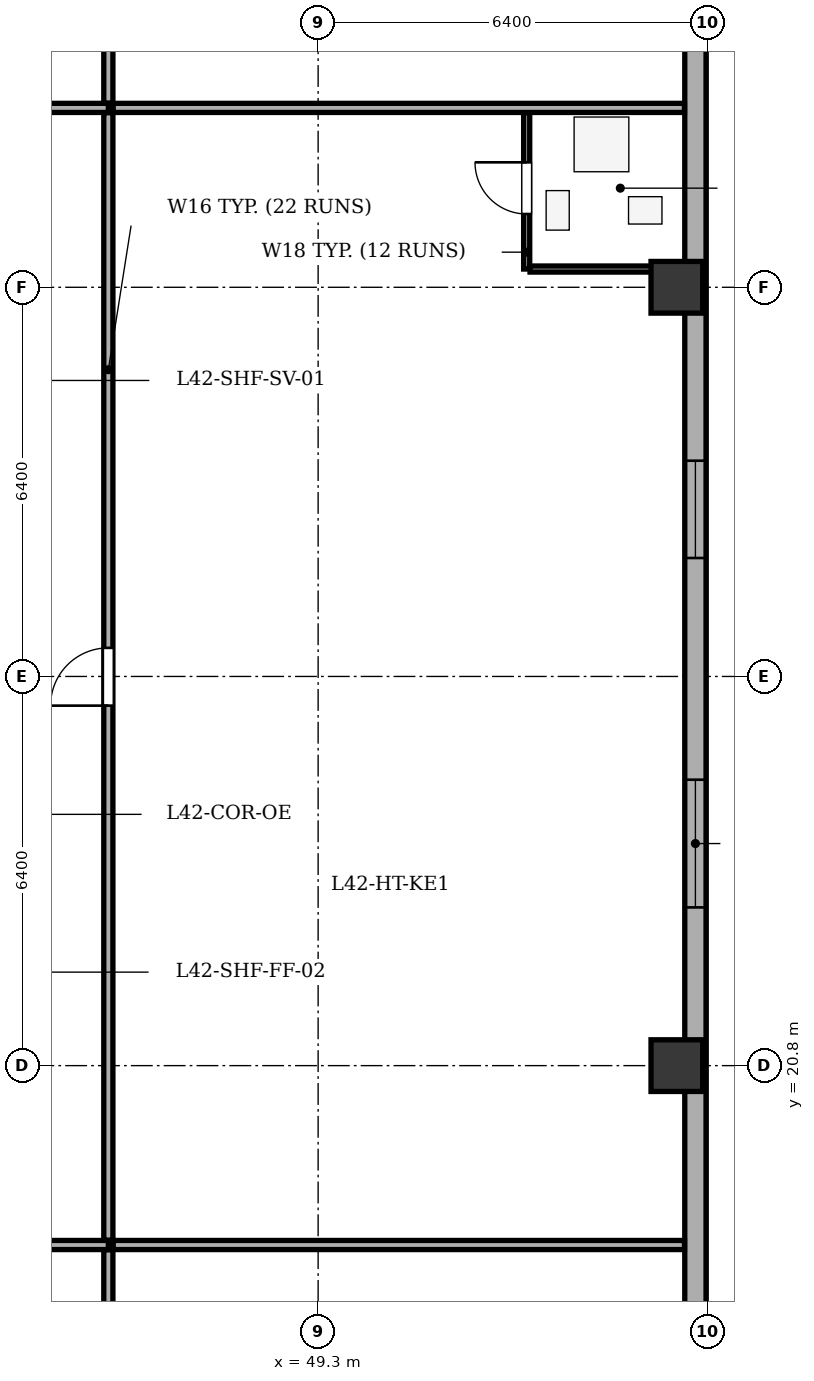
"""IFC4 building model, lengths in metres.
Left out: names, types, materials, properties, quantities, classifications, styles, units other than length and angle.
Written with IfcOpenShell. Run it as: python <this file> out.ifc"""

import sys

from ifc_helpers import new_model, si_unit, direction, frame, frame_2d, origin, origin_2d, place, context, subcontext, project, spatial, rectangle, extrude, element, fill, save


model = new_model("IFC4")
c1 = context("Model", 3, precision=1e-05, world=origin(), true_north=direction((0.0, 1.0)))
c2 = subcontext(c1, "Body", "Model", "MODEL_VIEW")
j1 = project(units=[si_unit("LENGTHUNIT", "METRE"), si_unit("PLANEANGLEUNIT", "RADIAN")], contexts=[c1])
p1 = place(None, origin())
s1 = spatial("IfcSite", under=j1, at=p1, CompositionType="ELEMENT")
p2 = place(p1, origin())
s2 = spatial("IfcBuilding", under=s1, at=p2, CompositionType="ELEMENT")
p3 = place(p2, frame((0.0, 0.0, 165.8)))
s3 = spatial("IfcBuildingStorey", under=s2, at=p3, CompositionType="ELEMENT", Elevation=165.8)
for number, where, z_axis, x_axis in (
    (1, (55.2, 20.8, 0.0), (0.0, 0.0, 1.0), (1.0, 0.0, 0.0)),
    (2, (55.2, 33.6, 0.0), (0.0, 0.0, 1.0), (1.0, 0.0, 0.0)),
):
    element("IfcColumn", number, at=place(p3, frame(where, z_axis=z_axis, x_axis=x_axis)), inside=s3, PredefinedType="COLUMN", context=c2, shape_type="SweptSolid", body=[
        extrude(rectangle(XDim=0.85, YDim=0.85, at=origin_2d()), origin(), (0.0, 0.0, 1.0), 3.5),
    ])
p4 = place(p3, frame((55.505, 47.9, 0.0), z_axis=(0.0, 0.0, 1.0), x_axis=(0.0, -1.0, 0.0)))
e3 = element("IfcWall", 3, at=p4, inside=s3, PredefinedType="STANDARD", context=c2, shape_type="SweptSolid", body=[
    extrude(rectangle(XDim=35.0, YDim=0.35, at=frame_2d((17.5, 0.0))), origin(), (0.0, 0.0, 1.0), 2.785),
])
p5 = place(p4, frame((2.595, 0.0, 0.75)))
e4 = element("IfcOpeningElement", 4, at=p5, cuts=e3, PredefinedType="OPENING", context=c2, shape_type="SweptSolid", body=[
    extrude(rectangle(XDim=1.6, YDim=1.75, at=frame_2d((0.8, 0.875))), frame((0.0, 0.185, 0.0), z_axis=(0.0, -1.0, 0.0), x_axis=(1.0, 0.0, 0.0)), (0.0, 0.0, 1.0), 0.37),
])
p6 = place(p4, frame((7.181, 0.0, 0.75)))
e5 = element("IfcOpeningElement", 5, at=p6, cuts=e3, PredefinedType="OPENING", context=c2, shape_type="SweptSolid", body=[
    extrude(rectangle(XDim=2.1, YDim=1.75, at=frame_2d((1.05, 0.875))), frame((0.0, 0.185, 0.0), z_axis=(0.0, -1.0, 0.0), x_axis=(1.0, 0.0, 0.0)), (0.0, 0.0, 1.0), 0.37),
])
p7 = place(p4, frame((17.152, 0.0, 0.75)))
e6 = element("IfcOpeningElement", 6, at=p7, cuts=e3, PredefinedType="OPENING", context=c2, shape_type="SweptSolid", body=[
    extrude(rectangle(XDim=1.6, YDim=1.75, at=frame_2d((0.8, 0.875))), frame((0.0, 0.185, 0.0), z_axis=(0.0, -1.0, 0.0), x_axis=(1.0, 0.0, 0.0)), (0.0, 0.0, 1.0), 0.37),
])
p8 = place(p4, frame((22.398, 0.0, 0.75)))
e7 = element("IfcOpeningElement", 7, at=p8, cuts=e3, PredefinedType="OPENING", context=c2, shape_type="SweptSolid", body=[
    extrude(rectangle(XDim=2.1, YDim=1.75, at=frame_2d((1.05, 0.875))), frame((0.0, 0.185, 0.0), z_axis=(0.0, -1.0, 0.0), x_axis=(1.0, 0.0, 0.0)), (0.0, 0.0, 1.0), 0.37),
])
p9 = place(p4, frame((31.588, 0.0, 0.75)))
e8 = element("IfcOpeningElement", 8, at=p9, cuts=e3, PredefinedType="OPENING", context=c2, shape_type="SweptSolid", body=[
    extrude(rectangle(XDim=1.6, YDim=1.75, at=frame_2d((0.8, 0.875))), frame((0.0, 0.185, 0.0), z_axis=(0.0, -1.0, 0.0), x_axis=(1.0, 0.0, 0.0)), (0.0, 0.0, 1.0), 0.37),
])
p10 = place(p3, frame((38.102, 17.85, 0.0), z_axis=(0.0, 0.0, 1.0), x_axis=(1.0, 0.0, 0.0)))
e9 = element("IfcWall", 9, at=p10, inside=s3, PredefinedType="PARTITIONING", context=c2, shape_type="SweptSolid", body=[
    extrude(rectangle(XDim=7.748, YDim=0.15, at=frame_2d((3.874, 0.0))), origin(), (0.0, 0.0, 1.0), 3.2),
])
p11 = place(p10, frame((3.394, 0.0, 0.0)))
e10 = element("IfcOpeningElement", 10, at=p11, cuts=e9, PredefinedType="OPENING", context=c2, shape_type="SweptSolid", body=[
    extrude(rectangle(XDim=0.95, YDim=2.1, at=frame_2d((0.475, 1.05))), frame((0.0, 0.085, 0.0), z_axis=(0.0, -1.0, 0.0), x_axis=(1.0, 0.0, 0.0)), (0.0, 0.0, 1.0), 0.17),
])
p12 = place(p3, frame((45.85, 8.275, 0.0), z_axis=(0.0, 0.0, 1.0), x_axis=(0.0, 1.0, 0.0)))
e11 = element("IfcWall", 11, at=p12, inside=s3, PredefinedType="PARTITIONING", context=c2, shape_type="SweptSolid", body=[
    extrude(rectangle(XDim=9.495, YDim=0.15, at=frame_2d((4.748, 0.0))), origin(), (0.0, 0.0, 1.0), 3.2),
])
p13 = place(p3, frame((35.377, 36.55, 0.0), z_axis=(0.0, 0.0, 1.0), x_axis=(1.0, 0.0, 0.0)))
e12 = element("IfcWall", 12, at=p13, inside=s3, PredefinedType="PARTITIONING", context=c2, shape_type="SweptSolid", body=[
    extrude(rectangle(XDim=10.473, YDim=0.15, at=frame_2d((5.237, 0.0))), origin(), (0.0, 0.0, 1.0), 3.2),
])
p14 = place(p13, frame((4.676, 0.0, 0.0)))
e13 = element("IfcOpeningElement", 13, at=p14, cuts=e12, PredefinedType="OPENING", context=c2, shape_type="SweptSolid", body=[
    extrude(rectangle(XDim=1.0, YDim=2.1, at=frame_2d((0.5, 1.05))), frame((0.0, 0.085, 0.0), z_axis=(0.0, -1.0, 0.0), x_axis=(1.0, 0.0, 0.0)), (0.0, 0.0, 1.0), 0.17),
])
p15 = place(p3, frame((45.85, 36.63, 0.0), z_axis=(0.0, 0.0, 1.0), x_axis=(0.0, 1.0, 0.0)))
e14 = element("IfcWall", 14, at=p15, inside=s3, PredefinedType="PARTITIONING", context=c2, shape_type="SweptSolid", body=[
    extrude(rectangle(XDim=15.895, YDim=0.15, at=frame_2d((7.948, 0.0))), origin(), (0.0, 0.0, 1.0), 3.2),
])
for number, where, z_axis, x_axis in (
    (15, (45.93, 17.85, 0.0), (0.0, 0.0, 1.0), (1.0, 0.0, 0.0)),
    (16, (45.93, 36.55, 0.0), (0.0, 0.0, 1.0), (1.0, 0.0, 0.0)),
):
    element("IfcWall", number, at=place(p3, frame(where, z_axis=z_axis, x_axis=x_axis)), inside=s3, PredefinedType="PARTITIONING", context=c2, shape_type="SweptSolid", body=[
        extrude(rectangle(XDim=9.395, YDim=0.15, at=frame_2d((4.698, 0.0))), origin(), (0.0, 0.0, 1.0), 3.2),
    ])
p16 = place(p3, frame((45.85, 17.93, 0.0), z_axis=(0.0, 0.0, 1.0), x_axis=(0.0, 1.0, 0.0)))
e17 = element("IfcWall", 17, at=p16, inside=s3, PredefinedType="PARTITIONING", context=c2, shape_type="SweptSolid", body=[
    extrude(rectangle(XDim=18.54, YDim=0.15, at=frame_2d((9.27, 0.0))), origin(), (0.0, 0.0, 1.0), 3.2),
])
p17 = place(p16, frame((8.79, 0.0, 0.0)))
e18 = element("IfcOpeningElement", 18, at=p17, cuts=e17, PredefinedType="OPENING", context=c2, shape_type="SweptSolid", body=[
    extrude(rectangle(XDim=0.95, YDim=2.1, at=frame_2d((0.475, 1.05))), frame((0.0, 0.085, 0.0), z_axis=(0.0, -1.0, 0.0), x_axis=(1.0, 0.0, 0.0)), (0.0, 0.0, 1.0), 0.17),
])
p18 = place(p3, frame((52.73, 33.9, 0.0), z_axis=(0.0, 0.0, 1.0), x_axis=(0.0, 1.0, 0.0)))
e19 = element("IfcWall", 19, at=p18, inside=s3, PredefinedType="PARTITIONING", context=c2, shape_type="SweptSolid", body=[
    extrude(rectangle(XDim=2.57, YDim=0.1, at=frame_2d((1.285, 0.0))), origin(), (0.0, 0.0, 1.0), 3.2),
])
p19 = place(p18, frame((0.905, 0.0, 0.0)))
e20 = element("IfcOpeningElement", 20, at=p19, cuts=e19, PredefinedType="OPENING", context=c2, shape_type="SweptSolid", body=[
    extrude(rectangle(XDim=0.85, YDim=2.05, at=frame_2d((0.425, 1.025))), frame((0.0, 0.06, 0.0), z_axis=(0.0, -1.0, 0.0), x_axis=(1.0, 0.0, 0.0)), (0.0, 0.0, 1.0), 0.12),
])
p20 = place(p3, frame((52.785, 33.9, 0.0), z_axis=(0.0, 0.0, 1.0), x_axis=(1.0, 0.0, 0.0)))
e21 = element("IfcWall", 21, at=p20, inside=s3, PredefinedType="PARTITIONING", context=c2, shape_type="SweptSolid", body=[
    extrude(rectangle(XDim=2.54, YDim=0.1, at=frame_2d((1.27, 0.0))), origin(), (0.0, 0.0, 1.0), 2.535),
])
p21 = place(p7, origin())
e22 = element("IfcWindow", 22, at=p21, inside=s3, PartitioningType="SINGLE_PANEL", PredefinedType="WINDOW", context=c2, shape_type="SweptSolid", body=[
    extrude(rectangle(XDim=1.6, YDim=1.75, at=frame_2d((0.8, 0.875))), frame((0.0, -0.01, 0.0), z_axis=(0.0, -1.0, 0.0), x_axis=(1.0, 0.0, 0.0)), (0.0, 0.0, 1.0), 0.06),
])
fill(e6, e22)
p22 = place(p8, origin())
e23 = element("IfcWindow", 23, at=p22, inside=s3, PartitioningType="SINGLE_PANEL", PredefinedType="WINDOW", context=c2, shape_type="SweptSolid", body=[
    extrude(rectangle(XDim=2.1, YDim=1.75, at=frame_2d((1.05, 0.875))), frame((0.0, -0.01, 0.0), z_axis=(0.0, -1.0, 0.0), x_axis=(1.0, 0.0, 0.0)), (0.0, 0.0, 1.0), 0.06),
])
fill(e7, e23)
p23 = place(p19, origin())
e24 = element("IfcDoor", 24, at=p23, inside=s3, OperationType="SINGLE_SWING_RIGHT", PredefinedType="DOOR", context=c2, shape_type="SweptSolid", body=[
    extrude(rectangle(XDim=0.85, YDim=2.05, at=frame_2d((0.425, 1.025))), frame((0.0, 0.025, 0.0), z_axis=(0.0, -1.0, 0.0), x_axis=(1.0, 0.0, 0.0)), (0.0, 0.0, 1.0), 0.05),
])
fill(e20, e24)
p24 = place(p17, origin())
e25 = element("IfcDoor", 25, at=p24, inside=s3, OperationType="SINGLE_SWING_LEFT", PredefinedType="DOOR", context=c2, shape_type="SweptSolid", body=[
    extrude(rectangle(XDim=0.95, YDim=2.1, at=frame_2d((0.475, 1.05))), frame((0.0, 0.025, 0.0), z_axis=(0.0, -1.0, 0.0), x_axis=(1.0, 0.0, 0.0)), (0.0, 0.0, 1.0), 0.05),
])
fill(e18, e25)
save(model, sys.argv[1])
